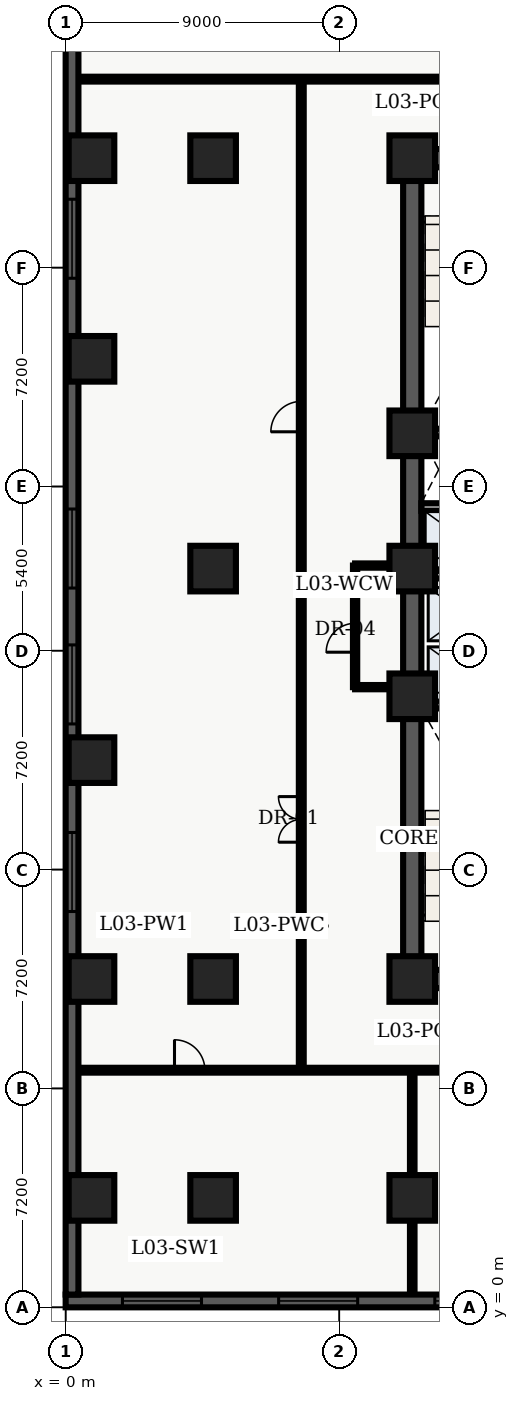
"""IFC4 building model, lengths in metres.
Left out: names, types, materials, properties, quantities, classifications, styles, units other than length and angle.
Written with IfcOpenShell. Run it as: python <this file> out.ifc"""

import sys

from ifc_helpers import new_model, entity, si_unit, converted_unit, direction, frame, origin_with_axes, origin_2d_with_axis, place, context, subcontext, project, spatial, polyline, rectangle, outline, extrude, element, fill, save


model = new_model("IFC4")
c1 = context("Model", 3, precision=1e-05, world=origin_with_axes(), true_north=direction((0.0, 1.0)))
c2 = subcontext(c1, "Body", "Model", "MODEL_VIEW")
j1 = project(units=[si_unit("LENGTHUNIT", "METRE"), converted_unit("PLANEANGLEUNIT", "DEGREE", entity("IfcPlaneAngleMeasure", 0.017), si_unit("PLANEANGLEUNIT", "RADIAN"), dimensions=[0, 0, 0, 0, 0, 0, 0])], contexts=[c1])
p1 = place(None, origin_with_axes())
s1 = spatial("IfcSite", under=j1, at=p1, CompositionType="ELEMENT")
p2 = place(p1, origin_with_axes())
s2 = spatial("IfcBuilding", under=s1, at=p2, CompositionType="ELEMENT")
p3 = place(p2, frame((0.0, 0.0, 15.3), z_axis=(0.0, 0.0, 1.0), x_axis=(1.0, 0.0, 0.0)))
s3 = spatial("IfcBuildingStorey", under=s2, at=p3, CompositionType="ELEMENT", Elevation=15.3)
p4 = place(p3, frame((11.4, 10.8, 0.0), z_axis=(0.0, 0.0, 1.0), x_axis=(0.0, 1.0, 0.0)))
e1 = element("IfcWall", 1, at=p4, inside=s3, PredefinedType="SHEAR", context=c2, shape_type="SweptSolid", body=[
    extrude(outline(polyline([(0.0, -0.3), (27.0, -0.3), (27.0, 0.3), (0.0, 0.3), (0.0, -0.3)])), origin_with_axes(), (0.0, 0.0, 1.0), 4.26),
])
p5 = place(p3, frame((11.4, 10.8, 0.0), z_axis=(0.0, 0.0, 1.0), x_axis=(1.0, 0.0, 0.0)))
e2 = element("IfcWall", 2, at=p5, inside=s3, PredefinedType="SHEAR", context=c2, shape_type="SweptSolid", body=[
    extrude(outline(polyline([(0.0, -0.3), (7.2, -0.3), (7.2, 0.3), (0.0, 0.3), (0.0, -0.3)])), origin_with_axes(), (0.0, 0.0, 1.0), 4.26),
])
p6 = place(p5, frame((2.625, 0.0, 0.0), z_axis=(0.0, 0.0, 1.0), x_axis=(1.0, 0.0, 0.0)))
e3 = element("IfcOpeningElement", 3, at=p6, cuts=e2, PredefinedType="OPENING", context=c2, shape_type="SweptSolid", body=[
    extrude(rectangle(XDim=1.05, YDim=0.62, at=origin_2d_with_axis()), origin_with_axes(), (0.0, 0.0, 1.0), 2.15),
])
p7 = place(p3, frame((11.4, 37.8, 0.0), z_axis=(0.0, 0.0, 1.0), x_axis=(1.0, 0.0, 0.0)))
e4 = element("IfcWall", 4, at=p7, inside=s3, PredefinedType="SHEAR", context=c2, shape_type="SweptSolid", body=[
    extrude(outline(polyline([(0.0, -0.3), (7.2, -0.3), (7.2, 0.3), (0.0, 0.3), (0.0, -0.3)])), origin_with_axes(), (0.0, 0.0, 1.0), 4.26),
])
p8 = place(p7, frame((2.625, 0.0, 0.0), z_axis=(0.0, 0.0, 1.0), x_axis=(1.0, 0.0, 0.0)))
e5 = element("IfcOpeningElement", 5, at=p8, cuts=e4, PredefinedType="OPENING", context=c2, shape_type="SweptSolid", body=[
    extrude(rectangle(XDim=1.05, YDim=0.62, at=origin_2d_with_axis()), origin_with_axes(), (0.0, 0.0, 1.0), 2.15),
])
for number, where, z_axis, x_axis in (
    (6, (11.7, 19.825, 0.0), (0.0, 0.0, 1.0), (1.0, 0.0, 0.0)),
    (7, (11.7, 28.775, 0.0), (0.0, 0.0, 1.0), (1.0, 0.0, 0.0)),
):
    element("IfcWall", number, at=place(p3, frame(where, z_axis=z_axis, x_axis=x_axis)), inside=s3, PredefinedType="SHEAR", context=c2, shape_type="SweptSolid", body=[
        extrude(outline(polyline([(0.0, -0.125), (6.6, -0.125), (6.6, 0.125), (0.0, 0.125), (0.0, -0.125)])), origin_with_axes(), (0.0, 0.0, 1.0), 4.26),
    ])
p9 = place(p3, frame((11.7, 24.1, 0.0), z_axis=(0.0, 0.0, 1.0), x_axis=(1.0, 0.0, 0.0)))
e8 = element("IfcWall", 8, at=p9, inside=s3, PredefinedType="SOLIDWALL", context=c2, shape_type="SweptSolid", body=[
    extrude(outline(polyline([(0.0, -0.125), (6.6, -0.125), (6.6, 0.125), (0.0, 0.125), (0.0, -0.125)])), origin_with_axes(), (0.0, 0.0, 1.0), 3.3),
])
p10 = place(p9, frame((3.6, 0.0, 0.0), z_axis=(0.0, 0.0, 1.0), x_axis=(1.0, 0.0, 0.0)))
e9 = element("IfcOpeningElement", 9, at=p10, cuts=e8, PredefinedType="OPENING", context=c2, shape_type="SweptSolid", body=[
    extrude(rectangle(XDim=0.9, YDim=0.27, at=origin_2d_with_axis()), origin_with_axes(), (0.0, 0.0, 1.0), 2.15),
])
p11 = place(p9, frame((5.65, 0.0, 0.0), z_axis=(0.0, 0.0, 1.0), x_axis=(1.0, 0.0, 0.0)))
e10 = element("IfcOpeningElement", 10, at=p11, cuts=e8, PredefinedType="OPENING", context=c2, shape_type="SweptSolid", body=[
    extrude(rectangle(XDim=0.9, YDim=0.27, at=origin_2d_with_axis()), origin_with_axes(), (0.0, 0.0, 1.0), 2.15),
])
p12 = place(p3, frame((11.7, 26.325, 0.0), z_axis=(0.0, 0.0, 1.0), x_axis=(1.0, 0.0, 0.0)))
e11 = element("IfcWall", 11, at=p12, inside=s3, PredefinedType="SOLIDWALL", context=c2, shape_type="SweptSolid", body=[
    extrude(outline(polyline([(0.0, -0.125), (6.6, -0.125), (6.6, 0.125), (0.0, 0.125), (0.0, -0.125)])), origin_with_axes(), (0.0, 0.0, 1.0), 3.3),
])
p13 = place(p12, frame((3.5, 0.0, 0.0), z_axis=(0.0, 0.0, 1.0), x_axis=(1.0, 0.0, 0.0)))
e12 = element("IfcOpeningElement", 12, at=p13, cuts=e11, PredefinedType="OPENING", context=c2, shape_type="SweptSolid", body=[
    extrude(rectangle(XDim=0.9, YDim=0.27, at=origin_2d_with_axis()), origin_with_axes(), (0.0, 0.0, 1.0), 2.15),
])
for number, where, z_axis, x_axis in (
    (13, (11.4, 3.6, 0.0), (0.0, 0.0, 1.0), (1.0, 0.0, 0.0)),
    (14, (11.4, 10.8, 0.0), (0.0, 0.0, 1.0), (1.0, 0.0, 0.0)),
    (15, (11.4, 20.1, 0.0), (0.0, 0.0, 1.0), (1.0, 0.0, 0.0)),
    (16, (11.4, 24.3, 0.0), (0.0, 0.0, 1.0), (1.0, 0.0, 0.0)),
    (17, (11.4, 28.75, 0.0), (0.0, 0.0, 1.0), (1.0, 0.0, 0.0)),
    (18, (11.4, 37.8, 0.0), (0.0, 0.0, 1.0), (1.0, 0.0, 0.0)),
    (19, (4.85, 3.6, 0.0), (0.0, 0.0, 1.0), (1.0, 0.0, 0.0)),
    (20, (4.85, 10.8, 0.0), (0.0, 0.0, 1.0), (1.0, 0.0, 0.0)),
    (21, (4.85, 24.3, 0.0), (0.0, 0.0, 1.0), (1.0, 0.0, 0.0)),
    (22, (4.85, 37.8, 0.0), (0.0, 0.0, 1.0), (1.0, 0.0, 0.0)),
    (23, (0.85, 3.6, 0.0), (0.0, 0.0, 1.0), (1.0, 0.0, 0.0)),
    (24, (0.85, 10.8, 0.0), (0.0, 0.0, 1.0), (1.0, 0.0, 0.0)),
    (25, (0.85, 18.0, 0.0), (0.0, 0.0, 1.0), (1.0, 0.0, 0.0)),
    (26, (0.85, 31.2, 0.0), (0.0, 0.0, 1.0), (1.0, 0.0, 0.0)),
    (27, (0.85, 37.8, 0.0), (0.0, 0.0, 1.0), (1.0, 0.0, 0.0)),
):
    element("IfcColumn", number, at=place(p3, frame(where, z_axis=z_axis, x_axis=x_axis)), inside=s3, PredefinedType="COLUMN", context=c2, shape_type="SweptSolid", body=[
        extrude(rectangle(XDim=1.5, YDim=1.5, at=origin_2d_with_axis()), origin_with_axes(), (0.0, 0.0, 1.0), 4.5),
    ])
p14 = place(p3, frame((9.52, 20.4, 0.0), z_axis=(0.0, 0.0, 1.0), x_axis=(0.0, 1.0, 0.0)))
e28 = element("IfcWall", 28, at=p14, inside=s3, PredefinedType="PARTITIONING", context=c2, shape_type="SweptSolid", body=[
    extrude(outline(polyline([(0.0, -0.07), (4.0, -0.07), (4.0, 0.07), (0.0, 0.07), (0.0, -0.07)])), origin_with_axes(), (0.0, 0.0, 1.0), 3.2),
])
p15 = place(p14, frame((1.625, 0.0, 0.0), z_axis=(0.0, 0.0, 1.0), x_axis=(1.0, 0.0, 0.0)))
e29 = element("IfcOpeningElement", 29, at=p15, cuts=e28, PredefinedType="OPENING", context=c2, shape_type="SweptSolid", body=[
    extrude(rectangle(XDim=0.95, YDim=0.16, at=origin_2d_with_axis()), origin_with_axes(), (0.0, 0.0, 1.0), 2.15),
])
for number, where, z_axis, x_axis in (
    (30, (9.52, 20.4, 0.0), (0.0, 0.0, 1.0), (1.0, 0.0, 0.0)),
    (31, (9.52, 24.4, 0.0), (0.0, 0.0, 1.0), (1.0, 0.0, 0.0)),
):
    element("IfcWall", number, at=place(p3, frame(where, z_axis=z_axis, x_axis=x_axis)), inside=s3, PredefinedType="PARTITIONING", context=c2, shape_type="SweptSolid", body=[
        extrude(outline(polyline([(0.0, -0.07), (1.58, -0.07), (1.58, 0.07), (0.0, 0.07), (0.0, -0.07)])), origin_with_axes(), (0.0, 0.0, 1.0), 3.2),
    ])
p16 = place(p3, frame((0.38, 7.8, 0.0), z_axis=(0.0, 0.0, 1.0), x_axis=(1.0, 0.0, 0.0)))
e32 = element("IfcWall", 32, at=p16, inside=s3, PredefinedType="PARTITIONING", context=c2, shape_type="SweptSolid", body=[
    extrude(outline(polyline([(0.0, -0.08), (20.92, -0.08), (20.92, 0.08), (0.0, 0.08), (0.0, -0.08)])), origin_with_axes(), (0.0, 0.0, 1.0), 3.2),
])
p17 = place(p16, frame((3.7, 0.0, 0.0), z_axis=(0.0, 0.0, 1.0), x_axis=(1.0, 0.0, 0.0)))
e33 = element("IfcOpeningElement", 33, at=p17, cuts=e32, PredefinedType="OPENING", context=c2, shape_type="SweptSolid", body=[
    extrude(rectangle(XDim=1.0, YDim=0.18, at=origin_2d_with_axis()), origin_with_axes(), (0.0, 0.0, 1.0), 2.15),
])
p18 = place(p16, frame((15.3, 0.0, 0.0), z_axis=(0.0, 0.0, 1.0), x_axis=(1.0, 0.0, 0.0)))
e34 = element("IfcOpeningElement", 34, at=p18, cuts=e32, PredefinedType="OPENING", context=c2, shape_type="SweptSolid", body=[
    extrude(rectangle(XDim=1.0, YDim=0.18, at=origin_2d_with_axis()), origin_with_axes(), (0.0, 0.0, 1.0), 2.15),
])
p19 = place(p3, frame((11.4, 0.38, 0.0), z_axis=(0.0, 0.0, 1.0), x_axis=(0.0, 1.0, 0.0)))
e35 = element("IfcWall", 35, at=p19, inside=s3, PredefinedType="PARTITIONING", context=c2, shape_type="SweptSolid", body=[
    extrude(outline(polyline([(0.0, -0.075), (7.42, -0.075), (7.42, 0.075), (0.0, 0.075), (0.0, -0.075)])), origin_with_axes(), (0.0, 0.0, 1.0), 3.2),
])
p20 = place(p3, frame((0.38, 40.4, 0.0), z_axis=(0.0, 0.0, 1.0), x_axis=(1.0, 0.0, 0.0)))
e36 = element("IfcWall", 36, at=p20, inside=s3, PredefinedType="PARTITIONING", context=c2, shape_type="SweptSolid", body=[
    extrude(outline(polyline([(0.0, -0.08), (20.92, -0.08), (20.92, 0.08), (0.0, 0.08), (0.0, -0.08)])), origin_with_axes(), (0.0, 0.0, 1.0), 3.2),
])
p21 = place(p20, frame((15.25, 0.0, 0.0), z_axis=(0.0, 0.0, 1.0), x_axis=(1.0, 0.0, 0.0)))
e37 = element("IfcOpeningElement", 37, at=p21, cuts=e36, PredefinedType="OPENING", context=c2, shape_type="SweptSolid", body=[
    extrude(rectangle(XDim=1.5, YDim=0.18, at=origin_2d_with_axis()), origin_with_axes(), (0.0, 0.0, 1.0), 2.2),
])
p22 = place(p3, frame((7.75, 7.8, 0.0), z_axis=(0.0, 0.0, 1.0), x_axis=(0.0, 1.0, 0.0)))
e38 = element("IfcWall", 38, at=p22, inside=s3, PredefinedType="PARTITIONING", context=c2, shape_type="SweptSolid", body=[
    extrude(outline(polyline([(0.0, -0.08), (32.6, -0.08), (32.6, 0.08), (0.0, 0.08), (0.0, -0.08)])), origin_with_axes(), (0.0, 0.0, 1.0), 3.2),
])
p23 = place(p22, frame((8.25, 0.0, 0.0), z_axis=(0.0, 0.0, 1.0), x_axis=(1.0, 0.0, 0.0)))
e39 = element("IfcOpeningElement", 39, at=p23, cuts=e38, PredefinedType="OPENING", context=c2, shape_type="SweptSolid", body=[
    extrude(rectangle(XDim=1.5, YDim=0.18, at=origin_2d_with_axis()), origin_with_axes(), (0.0, 0.0, 1.0), 2.2),
])
p24 = place(p22, frame((21.5, 0.0, 0.0), z_axis=(0.0, 0.0, 1.0), x_axis=(1.0, 0.0, 0.0)))
e40 = element("IfcOpeningElement", 40, at=p24, cuts=e38, PredefinedType="OPENING", context=c2, shape_type="SweptSolid", body=[
    extrude(rectangle(XDim=1.0, YDim=0.18, at=origin_2d_with_axis()), origin_with_axes(), (0.0, 0.0, 1.0), 2.15),
])
p25 = place(p3, frame((67.98, 0.21, 0.0), z_axis=(0.0, 0.0, 1.0), x_axis=(-1.0, 0.0, 0.0)))
e41 = element("IfcWall", 41, at=p25, inside=s3, PredefinedType="SOLIDWALL", context=c2, shape_type="SweptSolid", body=[
    extrude(outline(polyline([(0.0, -0.21), (67.98, -0.21), (67.98, 0.21), (0.0, 0.21), (0.0, -0.21)])), origin_with_axes(), (0.0, 0.0, 1.0), 4.26),
])
p26 = place(p25, frame((3.168, 0.0, 0.45), z_axis=(0.0, 0.0, 1.0), x_axis=(1.0, 0.0, 0.0)))
e42 = element("IfcOpeningElement", 42, at=p26, cuts=e41, PredefinedType="OPENING", context=c2, shape_type="SweptSolid", body=[
    extrude(rectangle(XDim=2.6, YDim=0.44, at=origin_2d_with_axis()), origin_with_axes(), (0.0, 0.0, 1.0), 2.8),
])
p27 = place(p25, frame((8.305, 0.0, 0.45), z_axis=(0.0, 0.0, 1.0), x_axis=(1.0, 0.0, 0.0)))
e43 = element("IfcOpeningElement", 43, at=p27, cuts=e41, PredefinedType="OPENING", context=c2, shape_type="SweptSolid", body=[
    extrude(rectangle(XDim=2.6, YDim=0.44, at=origin_2d_with_axis()), origin_with_axes(), (0.0, 0.0, 1.0), 2.8),
])
p28 = place(p25, frame((13.442, 0.0, 0.45), z_axis=(0.0, 0.0, 1.0), x_axis=(1.0, 0.0, 0.0)))
e44 = element("IfcOpeningElement", 44, at=p28, cuts=e41, PredefinedType="OPENING", context=c2, shape_type="SweptSolid", body=[
    extrude(rectangle(XDim=2.6, YDim=0.44, at=origin_2d_with_axis()), origin_with_axes(), (0.0, 0.0, 1.0), 2.8),
])
p29 = place(p25, frame((19.429, 0.0, 0.45), z_axis=(0.0, 0.0, 1.0), x_axis=(1.0, 0.0, 0.0)))
e45 = element("IfcOpeningElement", 45, at=p29, cuts=e41, PredefinedType="OPENING", context=c2, shape_type="SweptSolid", body=[
    extrude(rectangle(XDim=2.6, YDim=0.44, at=origin_2d_with_axis()), origin_with_axes(), (0.0, 0.0, 1.0), 2.8),
])
p30 = place(p25, frame((23.716, 0.0, 0.45), z_axis=(0.0, 0.0, 1.0), x_axis=(1.0, 0.0, 0.0)))
e46 = element("IfcOpeningElement", 46, at=p30, cuts=e41, PredefinedType="OPENING", context=c2, shape_type="SweptSolid", body=[
    extrude(rectangle(XDim=2.6, YDim=0.44, at=origin_2d_with_axis()), origin_with_axes(), (0.0, 0.0, 1.0), 2.8),
])
p31 = place(p25, frame((28.853, 0.0, 0.45), z_axis=(0.0, 0.0, 1.0), x_axis=(1.0, 0.0, 0.0)))
e47 = element("IfcOpeningElement", 47, at=p31, cuts=e41, PredefinedType="OPENING", context=c2, shape_type="SweptSolid", body=[
    extrude(rectangle(XDim=2.6, YDim=0.44, at=origin_2d_with_axis()), origin_with_axes(), (0.0, 0.0, 1.0), 2.8),
])
p32 = place(p25, frame((33.99, 0.0, 0.45), z_axis=(0.0, 0.0, 1.0), x_axis=(1.0, 0.0, 0.0)))
e48 = element("IfcOpeningElement", 48, at=p32, cuts=e41, PredefinedType="OPENING", context=c2, shape_type="SweptSolid", body=[
    extrude(rectangle(XDim=2.6, YDim=0.44, at=origin_2d_with_axis()), origin_with_axes(), (0.0, 0.0, 1.0), 2.8),
])
p33 = place(p25, frame((39.127, 0.0, 0.45), z_axis=(0.0, 0.0, 1.0), x_axis=(1.0, 0.0, 0.0)))
e49 = element("IfcOpeningElement", 49, at=p33, cuts=e41, PredefinedType="OPENING", context=c2, shape_type="SweptSolid", body=[
    extrude(rectangle(XDim=2.6, YDim=0.44, at=origin_2d_with_axis()), origin_with_axes(), (0.0, 0.0, 1.0), 2.8),
])
p34 = place(p25, frame((44.264, 0.0, 0.45), z_axis=(0.0, 0.0, 1.0), x_axis=(1.0, 0.0, 0.0)))
e50 = element("IfcOpeningElement", 50, at=p34, cuts=e41, PredefinedType="OPENING", context=c2, shape_type="SweptSolid", body=[
    extrude(rectangle(XDim=2.6, YDim=0.44, at=origin_2d_with_axis()), origin_with_axes(), (0.0, 0.0, 1.0), 2.8),
])
p35 = place(p25, frame((49.401, 0.0, 0.45), z_axis=(0.0, 0.0, 1.0), x_axis=(1.0, 0.0, 0.0)))
e51 = element("IfcOpeningElement", 51, at=p35, cuts=e41, PredefinedType="OPENING", context=c2, shape_type="SweptSolid", body=[
    extrude(rectangle(XDim=2.6, YDim=0.44, at=origin_2d_with_axis()), origin_with_axes(), (0.0, 0.0, 1.0), 2.8),
])
p36 = place(p25, frame((54.538, 0.0, 0.45), z_axis=(0.0, 0.0, 1.0), x_axis=(1.0, 0.0, 0.0)))
e52 = element("IfcOpeningElement", 52, at=p36, cuts=e41, PredefinedType="OPENING", context=c2, shape_type="SweptSolid", body=[
    extrude(rectangle(XDim=2.6, YDim=0.44, at=origin_2d_with_axis()), origin_with_axes(), (0.0, 0.0, 1.0), 2.8),
])
p37 = place(p25, frame((59.675, 0.0, 0.45), z_axis=(0.0, 0.0, 1.0), x_axis=(1.0, 0.0, 0.0)))
e53 = element("IfcOpeningElement", 53, at=p37, cuts=e41, PredefinedType="OPENING", context=c2, shape_type="SweptSolid", body=[
    extrude(rectangle(XDim=2.6, YDim=0.44, at=origin_2d_with_axis()), origin_with_axes(), (0.0, 0.0, 1.0), 2.8),
])
p38 = place(p25, frame((64.812, 0.0, 0.45), z_axis=(0.0, 0.0, 1.0), x_axis=(1.0, 0.0, 0.0)))
e54 = element("IfcOpeningElement", 54, at=p38, cuts=e41, PredefinedType="OPENING", context=c2, shape_type="SweptSolid", body=[
    extrude(rectangle(XDim=2.6, YDim=0.44, at=origin_2d_with_axis()), origin_with_axes(), (0.0, 0.0, 1.0), 2.8),
])
p39 = place(p3, frame((0.21, 0.42, 0.0), z_axis=(0.0, 0.0, 1.0), x_axis=(0.0, 1.0, 0.0)))
e55 = element("IfcWall", 55, at=p39, inside=s3, PredefinedType="SOLIDWALL", context=c2, shape_type="SweptSolid", body=[
    extrude(outline(polyline([(0.0, -0.21), (49.08, -0.21), (49.08, 0.21), (0.0, 0.21), (0.0, -0.21)])), origin_with_axes(), (0.0, 0.0, 1.0), 4.26),
])
p40 = place(p39, frame((13.9, 0.0, 0.45), z_axis=(0.0, 0.0, 1.0), x_axis=(1.0, 0.0, 0.0)))
e56 = element("IfcOpeningElement", 56, at=p40, cuts=e55, PredefinedType="OPENING", context=c2, shape_type="SweptSolid", body=[
    extrude(rectangle(XDim=2.6, YDim=0.44, at=origin_2d_with_axis()), origin_with_axes(), (0.0, 0.0, 1.0), 2.8),
])
p41 = place(p39, frame((20.07, 0.0, 0.45), z_axis=(0.0, 0.0, 1.0), x_axis=(1.0, 0.0, 0.0)))
e57 = element("IfcOpeningElement", 57, at=p41, cuts=e55, PredefinedType="OPENING", context=c2, shape_type="SweptSolid", body=[
    extrude(rectangle(XDim=2.6, YDim=0.44, at=origin_2d_with_axis()), origin_with_axes(), (0.0, 0.0, 1.0), 2.8),
])
p42 = place(p39, frame((24.54, 0.0, 0.45), z_axis=(0.0, 0.0, 1.0), x_axis=(1.0, 0.0, 0.0)))
e58 = element("IfcOpeningElement", 58, at=p42, cuts=e55, PredefinedType="OPENING", context=c2, shape_type="SweptSolid", body=[
    extrude(rectangle(XDim=2.6, YDim=0.44, at=origin_2d_with_axis()), origin_with_axes(), (0.0, 0.0, 1.0), 2.8),
])
p43 = place(p39, frame((34.73, 0.0, 0.45), z_axis=(0.0, 0.0, 1.0), x_axis=(1.0, 0.0, 0.0)))
e59 = element("IfcOpeningElement", 59, at=p43, cuts=e55, PredefinedType="OPENING", context=c2, shape_type="SweptSolid", body=[
    extrude(rectangle(XDim=2.6, YDim=0.44, at=origin_2d_with_axis()), origin_with_axes(), (0.0, 0.0, 1.0), 2.8),
])
p44 = place(p14, frame((1.625, 0.0, 0.0), z_axis=(0.0, 0.0, 1.0), x_axis=(1.0, 0.0, 0.0)))
e60 = element("IfcDoor", 60, at=p44, inside=s3, OperationType="SINGLE_SWING_LEFT", PredefinedType="DOOR", context=c2, shape_type="SweptSolid", body=[
    extrude(rectangle(XDim=0.95, YDim=0.084, at=origin_2d_with_axis()), origin_with_axes(), (0.0, 0.0, 1.0), 2.15),
])
fill(e29, e60)
p45 = place(p16, frame((3.7, 0.0, 0.0), z_axis=(0.0, 0.0, 1.0), x_axis=(1.0, 0.0, 0.0)))
e61 = element("IfcDoor", 61, at=p45, inside=s3, OperationType="SINGLE_SWING_LEFT", PredefinedType="DOOR", context=c2, shape_type="SweptSolid", body=[
    extrude(rectangle(XDim=1.0, YDim=0.09, at=origin_2d_with_axis()), origin_with_axes(), (0.0, 0.0, 1.0), 2.15),
])
fill(e33, e61)
p46 = place(p22, frame((8.25, 0.0, 0.0), z_axis=(0.0, 0.0, 1.0), x_axis=(1.0, 0.0, 0.0)))
e62 = element("IfcDoor", 62, at=p46, inside=s3, OperationType="DOUBLE_DOOR_SINGLE_SWING", PredefinedType="DOOR", context=c2, shape_type="SweptSolid", body=[
    extrude(rectangle(XDim=1.5, YDim=0.09, at=origin_2d_with_axis()), origin_with_axes(), (0.0, 0.0, 1.0), 2.2),
])
fill(e39, e62)
p47 = place(p22, frame((21.5, 0.0, 0.0), z_axis=(0.0, 0.0, 1.0), x_axis=(1.0, 0.0, 0.0)))
e63 = element("IfcDoor", 63, at=p47, inside=s3, OperationType="SINGLE_SWING_LEFT", PredefinedType="DOOR", context=c2, shape_type="SweptSolid", body=[
    extrude(rectangle(XDim=1.0, YDim=0.09, at=origin_2d_with_axis()), origin_with_axes(), (0.0, 0.0, 1.0), 2.15),
])
fill(e40, e63)
p48 = place(p25, frame((54.538, 0.0, 0.45), z_axis=(0.0, 0.0, 1.0), x_axis=(1.0, 0.0, 0.0)))
e64 = element("IfcWindow", 64, at=p48, inside=s3, PredefinedType="WINDOW", context=c2, shape_type="SweptSolid", body=[
    extrude(rectangle(XDim=2.6, YDim=0.09, at=origin_2d_with_axis()), origin_with_axes(), (0.0, 0.0, 1.0), 2.8),
])
fill(e52, e64)
p49 = place(p25, frame((59.675, 0.0, 0.45), z_axis=(0.0, 0.0, 1.0), x_axis=(1.0, 0.0, 0.0)))
e65 = element("IfcWindow", 65, at=p49, inside=s3, PredefinedType="WINDOW", context=c2, shape_type="SweptSolid", body=[
    extrude(rectangle(XDim=2.6, YDim=0.09, at=origin_2d_with_axis()), origin_with_axes(), (0.0, 0.0, 1.0), 2.8),
])
fill(e53, e65)
p50 = place(p25, frame((64.812, 0.0, 0.45), z_axis=(0.0, 0.0, 1.0), x_axis=(1.0, 0.0, 0.0)))
e66 = element("IfcWindow", 66, at=p50, inside=s3, PredefinedType="WINDOW", context=c2, shape_type="SweptSolid", body=[
    extrude(rectangle(XDim=2.6, YDim=0.09, at=origin_2d_with_axis()), origin_with_axes(), (0.0, 0.0, 1.0), 2.8),
])
fill(e54, e66)
p51 = place(p39, frame((13.9, 0.0, 0.45), z_axis=(0.0, 0.0, 1.0), x_axis=(1.0, 0.0, 0.0)))
e67 = element("IfcWindow", 67, at=p51, inside=s3, PredefinedType="WINDOW", context=c2, shape_type="SweptSolid", body=[
    extrude(rectangle(XDim=2.6, YDim=0.09, at=origin_2d_with_axis()), origin_with_axes(), (0.0, 0.0, 1.0), 2.8),
])
fill(e56, e67)
p52 = place(p39, frame((20.07, 0.0, 0.45), z_axis=(0.0, 0.0, 1.0), x_axis=(1.0, 0.0, 0.0)))
e68 = element("IfcWindow", 68, at=p52, inside=s3, PredefinedType="WINDOW", context=c2, shape_type="SweptSolid", body=[
    extrude(rectangle(XDim=2.6, YDim=0.09, at=origin_2d_with_axis()), origin_with_axes(), (0.0, 0.0, 1.0), 2.8),
])
fill(e57, e68)
p53 = place(p39, frame((24.54, 0.0, 0.45), z_axis=(0.0, 0.0, 1.0), x_axis=(1.0, 0.0, 0.0)))
e69 = element("IfcWindow", 69, at=p53, inside=s3, PredefinedType="WINDOW", context=c2, shape_type="SweptSolid", body=[
    extrude(rectangle(XDim=2.6, YDim=0.09, at=origin_2d_with_axis()), origin_with_axes(), (0.0, 0.0, 1.0), 2.8),
])
fill(e58, e69)
p54 = place(p39, frame((34.73, 0.0, 0.45), z_axis=(0.0, 0.0, 1.0), x_axis=(1.0, 0.0, 0.0)))
e70 = element("IfcWindow", 70, at=p54, inside=s3, PredefinedType="WINDOW", context=c2, shape_type="SweptSolid", body=[
    extrude(rectangle(XDim=2.6, YDim=0.09, at=origin_2d_with_axis()), origin_with_axes(), (0.0, 0.0, 1.0), 2.8),
])
fill(e59, e70)
save(model, sys.argv[1])
